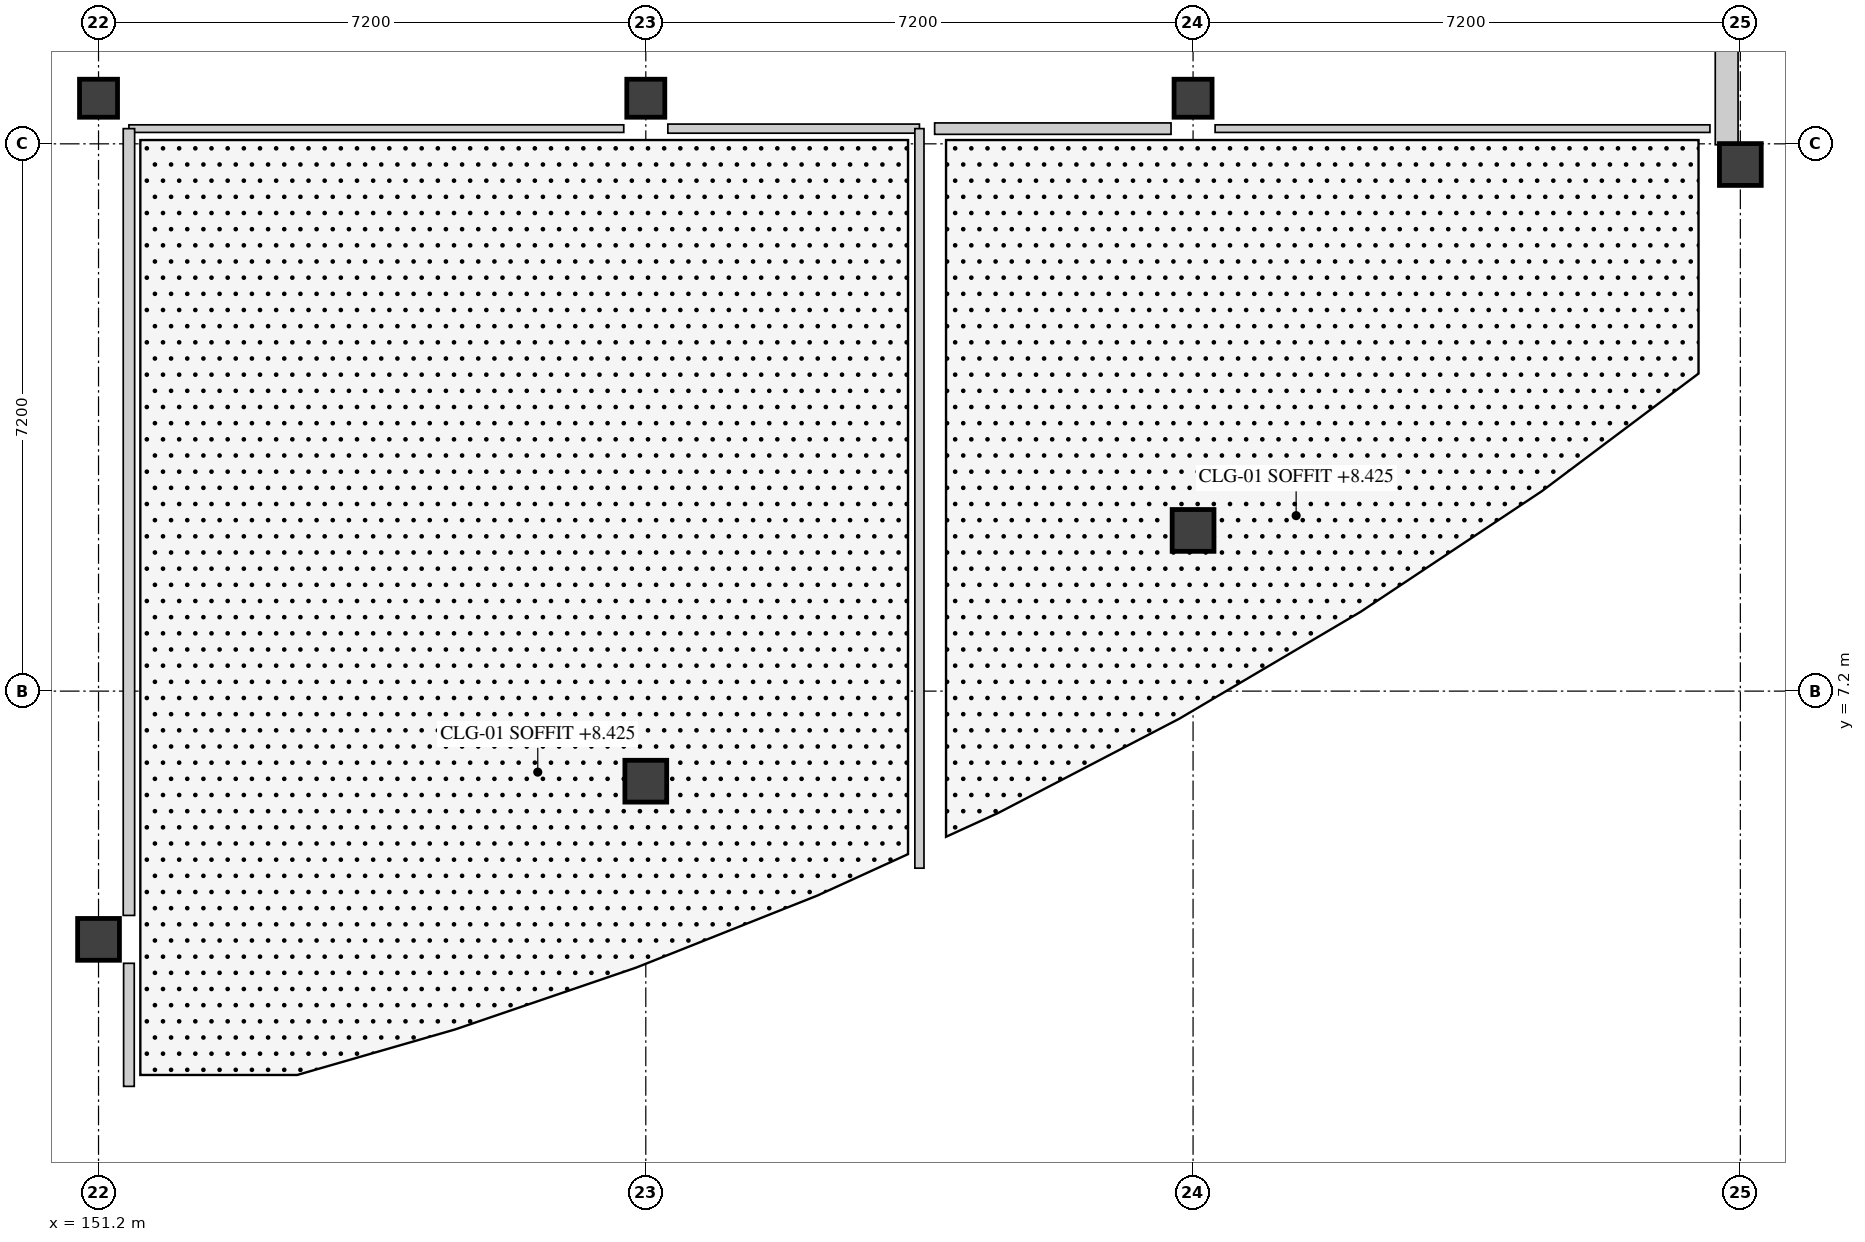
"""IFC4 building model, lengths in metres.
Left out: names, types, materials, properties, quantities, classifications, styles, units other than length and angle.
Written with IfcOpenShell. Run it as: python <this file> out.ifc"""

import sys

from ifc_helpers import new_model, si_unit, direction, frame, frame_2d, origin, origin_2d, place, context, subcontext, project, spatial, rectangle, extrude, element, fill, save


model = new_model("IFC4")
c1 = context("Model", 3, precision=1e-05, world=origin(), true_north=direction((0.0, 1.0)))
c2 = subcontext(c1, "Body", "Model", "MODEL_VIEW")
j1 = project(units=[si_unit("LENGTHUNIT", "METRE"), si_unit("PLANEANGLEUNIT", "RADIAN")], contexts=[c1])
p1 = place(None, origin())
s1 = spatial("IfcSite", under=j1, at=p1, CompositionType="ELEMENT")
p2 = place(p1, origin())
s2 = spatial("IfcBuilding", under=s1, at=p2, CompositionType="ELEMENT")
p3 = place(p2, frame((0.0, 0.0, 4.5)))
s3 = spatial("IfcBuildingStorey", under=s2, at=p3, CompositionType="ELEMENT", Elevation=4.5)
p4 = place(p3, frame((151.2, 3.934, 0.0), z_axis=(0.0, 0.0, 1.0), x_axis=(1.0, 0.0, 0.0)))
e1 = element("IfcColumn", 1, at=p4, inside=s3, PredefinedType="COLUMN", context=c2, shape_type="SweptSolid", body=[
    extrude(rectangle(XDim=0.55, YDim=0.55, at=origin_2d()), origin(), (0.0, 0.0, 1.0), 4.2),
])
p5 = place(p3, frame((151.2, 15.0, 0.0), z_axis=(0.0, 0.0, 1.0), x_axis=(1.0, 0.0, 0.0)))
e2 = element("IfcColumn", 2, at=p5, inside=s3, PredefinedType="COLUMN", context=c2, shape_type="SweptSolid", body=[
    extrude(rectangle(XDim=0.5, YDim=0.5, at=origin_2d()), origin(), (0.0, 0.0, 1.0), 4.2),
])
p6 = place(p3, frame((158.4, 6.015, 0.0), z_axis=(0.0, 0.0, 1.0), x_axis=(1.0, 0.0, 0.0)))
e3 = element("IfcColumn", 3, at=p6, inside=s3, PredefinedType="COLUMN", context=c2, shape_type="SweptSolid", body=[
    extrude(rectangle(XDim=0.55, YDim=0.55, at=origin_2d()), origin(), (0.0, 0.0, 1.0), 4.2),
])
p7 = place(p3, frame((158.4, 15.0, 0.0), z_axis=(0.0, 0.0, 1.0), x_axis=(1.0, 0.0, 0.0)))
e4 = element("IfcColumn", 4, at=p7, inside=s3, PredefinedType="COLUMN", context=c2, shape_type="SweptSolid", body=[
    extrude(rectangle(XDim=0.5, YDim=0.5, at=origin_2d()), origin(), (0.0, 0.0, 1.0), 4.2),
])
p8 = place(p3, frame((165.6, 9.314, 0.0), z_axis=(0.0, 0.0, 1.0), x_axis=(1.0, 0.0, 0.0)))
e5 = element("IfcColumn", 5, at=p8, inside=s3, PredefinedType="COLUMN", context=c2, shape_type="SweptSolid", body=[
    extrude(rectangle(XDim=0.55, YDim=0.55, at=origin_2d()), origin(), (0.0, 0.0, 1.0), 4.2),
])
p9 = place(p3, frame((165.6, 15.0, 0.0), z_axis=(0.0, 0.0, 1.0), x_axis=(1.0, 0.0, 0.0)))
e6 = element("IfcColumn", 6, at=p9, inside=s3, PredefinedType="COLUMN", context=c2, shape_type="SweptSolid", body=[
    extrude(rectangle(XDim=0.5, YDim=0.5, at=origin_2d()), origin(), (0.0, 0.0, 1.0), 4.2),
])
p10 = place(p3, frame((172.8, 14.128, 0.0), z_axis=(0.0, 0.0, 1.0), x_axis=(1.0, 0.0, 0.0)))
e7 = element("IfcColumn", 7, at=p10, inside=s3, PredefinedType="COLUMN", context=c2, shape_type="SweptSolid", body=[
    extrude(rectangle(XDim=0.55, YDim=0.55, at=origin_2d()), origin(), (0.0, 0.0, 1.0), 4.2),
])
p11 = place(p3, frame((172.62, 22.165, 0.0), z_axis=(0.0, 0.0, 1.0), x_axis=(0.0, -1.0, 0.0)))
e8 = element("IfcWall", 8, at=p11, inside=s3, PredefinedType="SOLIDWALL", context=c2, shape_type="SweptSolid", body=[
    extrude(rectangle(XDim=7.777, YDim=0.3, at=frame_2d((3.889, 0.0))), origin(), (0.0, 0.0, 1.0), 3.33),
])
p12 = place(p11, frame((3.138, 0.0, 0.9)))
e9 = element("IfcOpeningElement", 9, at=p12, cuts=e8, PredefinedType="OPENING", context=c2, shape_type="SweptSolid", body=[
    extrude(rectangle(XDim=1.5, YDim=0.75, at=frame_2d((0.75, 0.375))), frame((0.0, 0.16, 0.0), z_axis=(0.0, -1.0, 0.0), x_axis=(1.0, 0.0, 0.0)), (0.0, 0.0, 1.0), 0.32),
])
p13 = place(p3, frame((162.0, 14.6, 0.0), z_axis=(0.0, 0.0, 1.0), x_axis=(-1.0, 0.0, 0.0)))
e10 = element("IfcWall", 10, at=p13, inside=s3, PredefinedType="PARTITIONING", context=c2, shape_type="SweptSolid", body=[
    extrude(rectangle(XDim=3.31, YDim=0.12, at=frame_2d((1.655, 0.0))), origin(), (0.0, 0.0, 1.0), 3.95),
])
p14 = place(p13, frame((0.755, 0.0, 0.0)))
e11 = element("IfcOpeningElement", 11, at=p14, cuts=e10, PredefinedType="OPENING", context=c2, shape_type="SweptSolid", body=[
    extrude(rectangle(XDim=1.8, YDim=2.3, at=frame_2d((0.9, 1.15))), frame((0.0, 0.07, 0.0), z_axis=(0.0, -1.0, 0.0), x_axis=(1.0, 0.0, 0.0)), (0.0, 0.0, 1.0), 0.14),
])
p15 = place(p3, frame((158.11, 14.6, 0.0), z_axis=(0.0, 0.0, 1.0), x_axis=(-1.0, 0.0, 0.0)))
e12 = element("IfcWall", 12, at=p15, inside=s3, PredefinedType="PARTITIONING", context=c2, shape_type="SweptSolid", body=[
    extrude(rectangle(XDim=6.51, YDim=0.1, at=frame_2d((3.255, 0.0))), origin(), (0.0, 0.0, 1.0), 3.95),
])
p16 = place(p3, frame((151.6, 14.6, 0.0), z_axis=(0.0, 0.0, 1.0), x_axis=(0.0, -1.0, 0.0)))
e13 = element("IfcWall", 13, at=p16, inside=s3, PredefinedType="PARTITIONING", context=c2, shape_type="SweptSolid", body=[
    extrude(rectangle(XDim=10.351, YDim=0.15, at=frame_2d((5.176, 0.0))), origin(), (0.0, 0.0, 1.0), 3.35),
])
p17 = place(p3, frame((151.6, 3.619, 0.0), z_axis=(0.0, 0.0, 1.0), x_axis=(0.0, -1.0, 0.0)))
e14 = element("IfcWall", 14, at=p17, inside=s3, PredefinedType="PARTITIONING", context=c2, shape_type="SweptSolid", body=[
    extrude(rectangle(XDim=1.619, YDim=0.14, at=frame_2d((0.81, 0.0))), origin(), (0.0, 0.0, 1.0), 3.35),
])
p18 = place(p3, frame((162.0, 4.871, 0.0), z_axis=(0.0, 0.0, 1.0), x_axis=(0.0, 1.0, 0.0)))
e15 = element("IfcWall", 15, at=p18, inside=s3, PredefinedType="PARTITIONING", context=c2, shape_type="SweptSolid", body=[
    extrude(rectangle(XDim=9.729, YDim=0.12, at=frame_2d((4.865, 0.0))), origin(), (0.0, 0.0, 1.0), 3.35),
])
p19 = place(p3, frame((172.4, 14.6, 0.0), z_axis=(0.0, 0.0, 1.0), x_axis=(-1.0, 0.0, 0.0)))
e16 = element("IfcWall", 16, at=p19, inside=s3, PredefinedType="PARTITIONING", context=c2, shape_type="SweptSolid", body=[
    extrude(rectangle(XDim=6.51, YDim=0.1, at=frame_2d((3.255, 0.0))), origin(), (0.0, 0.0, 1.0), 3.95),
])
p20 = place(p19, frame((2.43, 0.0, 0.0)))
e17 = element("IfcOpeningElement", 17, at=p20, cuts=e16, PredefinedType="OPENING", context=c2, shape_type="SweptSolid", body=[
    extrude(rectangle(XDim=1.65, YDim=2.3, at=frame_2d((0.825, 1.15))), frame((0.0, 0.06, 0.0), z_axis=(0.0, -1.0, 0.0), x_axis=(1.0, 0.0, 0.0)), (0.0, 0.0, 1.0), 0.12),
])
p21 = place(p3, frame((165.31, 14.6, 0.0), z_axis=(0.0, 0.0, 1.0), x_axis=(-1.0, 0.0, 0.0)))
e18 = element("IfcWall", 18, at=p21, inside=s3, PredefinedType="PARTITIONING", context=c2, shape_type="SweptSolid", body=[
    extrude(rectangle(XDim=3.11, YDim=0.15, at=frame_2d((1.555, 0.0))), origin(), (0.0, 0.0, 1.0), 3.95),
])
p22 = place(p14, origin())
e19 = element("IfcDoor", 19, at=p22, inside=s3, OperationType="SINGLE_SWING_LEFT", PredefinedType="DOOR", context=c2, shape_type="SweptSolid", body=[
    extrude(rectangle(XDim=1.8, YDim=2.3, at=frame_2d((0.9, 1.15))), frame((0.0, 0.025, 0.0), z_axis=(0.0, -1.0, 0.0), x_axis=(1.0, 0.0, 0.0)), (0.0, 0.0, 1.0), 0.05),
])
fill(e11, e19)
p23 = place(p20, origin())
e20 = element("IfcDoor", 20, at=p23, inside=s3, OperationType="SINGLE_SWING_RIGHT", PredefinedType="DOOR", context=c2, shape_type="SweptSolid", body=[
    extrude(rectangle(XDim=1.65, YDim=2.3, at=frame_2d((0.825, 1.15))), frame((0.0, 0.025, 0.0), z_axis=(0.0, -1.0, 0.0), x_axis=(1.0, 0.0, 0.0)), (0.0, 0.0, 1.0), 0.05),
])
fill(e17, e20)
save(model, sys.argv[1])
